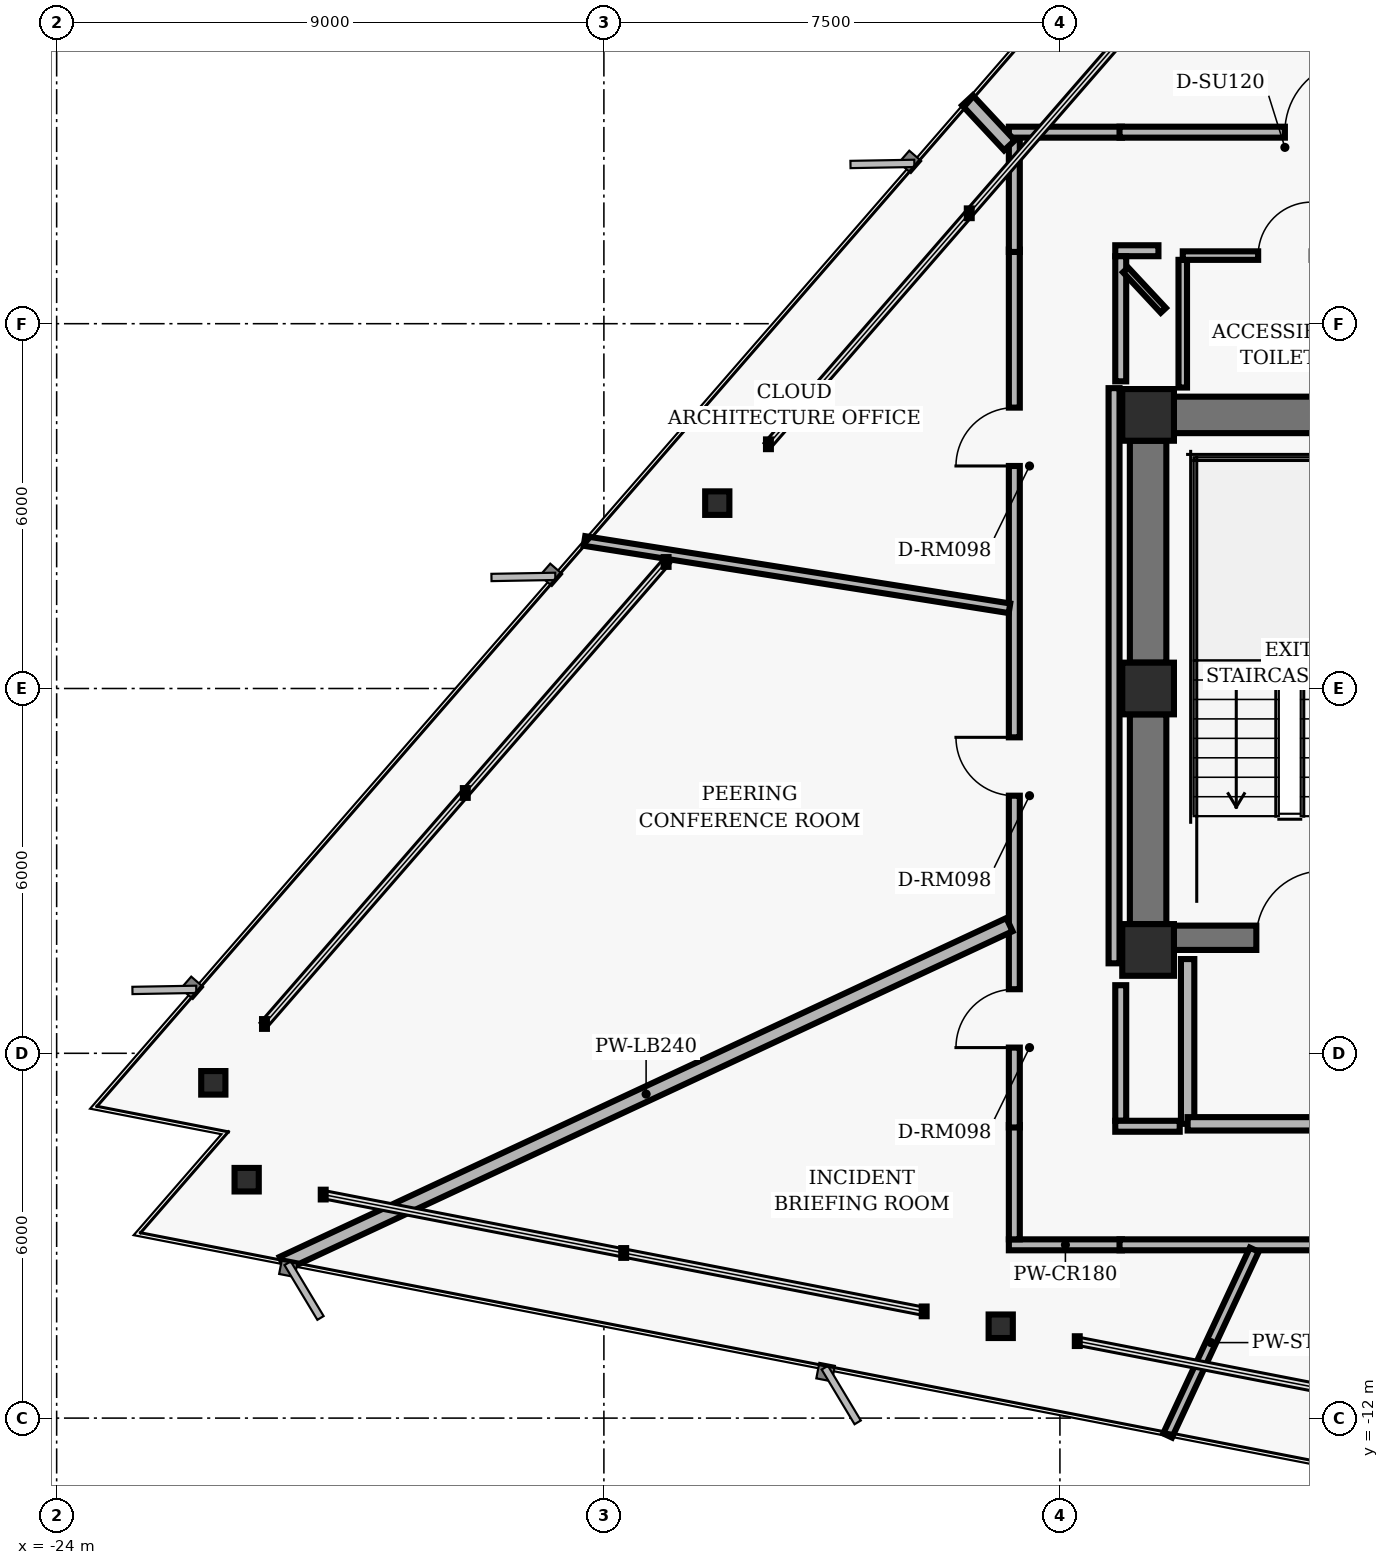
"""IFC4 building model, lengths in metres.
Left out: names, types, materials, properties, quantities, classifications, styles, units other than length and angle.
Written with IfcOpenShell. Run it as: python <this file> out.ifc"""

import sys

from ifc_helpers import new_model, si_unit, direction, frame, frame_2d, origin, origin_2d, place, context, subcontext, project, spatial, rectangle, hollow_rectangle, i_section, extrude, element, fill, save


model = new_model("IFC4")
c1 = context("Model", 3, precision=1e-05, world=origin(), true_north=direction((0.0, 1.0)))
c2 = subcontext(c1, "Body", "Model", "MODEL_VIEW")
j1 = project(units=[si_unit("LENGTHUNIT", "METRE"), si_unit("PLANEANGLEUNIT", "RADIAN")], contexts=[c1])
p1 = place(None, origin())
s1 = spatial("IfcSite", under=j1, at=p1, CompositionType="ELEMENT")
p2 = place(p1, origin())
s2 = spatial("IfcBuilding", under=s1, at=p2, CompositionType="ELEMENT")
p3 = place(p2, frame((0.0, 0.0, 159.36)))
s3 = spatial("IfcBuildingStorey", under=s2, at=p3, CompositionType="ELEMENT", Elevation=159.36)
for number, where, z_axis, x_axis in (
    (1, (-6.05, 4.5, 0.0), (0.0, 0.0, 1.0), (1.0, 0.0, 0.0)),
    (2, (-6.05, 0.0, 0.0), (0.0, 0.0, 1.0), (1.0, 0.0, 0.0)),
    (3, (-6.05, -4.3, 0.0), (0.0, 0.0, 1.0), (1.0, 0.0, 0.0)),
):
    element("IfcColumn", number, at=place(p3, frame(where, z_axis=z_axis, x_axis=x_axis)), inside=s3, PredefinedType="COLUMN", context=c2, shape_type="SweptSolid", body=[
        extrude(hollow_rectangle(XDim=0.85, YDim=0.85, WallThickness=0.055, InnerFilletRadius=0.02, OuterFilletRadius=0.04, at=origin_2d()), origin(), (0.0, 0.0, 1.0), 3.04),
    ])
p4 = place(p3, frame((-6.05, 0.425, 0.0), z_axis=(0.0, 0.0, 1.0), x_axis=(0.0, 1.0, 0.0)))
e4 = element("IfcWall", 4, at=p4, inside=s3, PredefinedType="SHEAR", context=c2, shape_type="SweptSolid", body=[
    extrude(rectangle(XDim=3.65, YDim=0.6, at=frame_2d((1.825, 0.0))), origin(), (0.0, 0.0, 1.0), 2.788),
])
p5 = place(p3, frame((-6.05, -3.875, 0.0), z_axis=(0.0, 0.0, 1.0), x_axis=(0.0, 1.0, 0.0)))
e5 = element("IfcWall", 5, at=p5, inside=s3, PredefinedType="SHEAR", context=c2, shape_type="SweptSolid", body=[
    extrude(rectangle(XDim=3.45, YDim=0.6, at=frame_2d((1.725, 0.0))), origin(), (0.0, 0.0, 1.0), 2.788),
])
p6 = place(p3, frame((-5.625, -4.1, 0.0), z_axis=(0.0, 0.0, 1.0), x_axis=(1.0, 0.0, 0.0)))
e6 = element("IfcWall", 6, at=p6, inside=s3, PredefinedType="SHEAR", context=c2, shape_type="SweptSolid", body=[
    extrude(rectangle(XDim=11.25, YDim=0.4, at=frame_2d((5.625, 0.0))), origin(), (0.0, 0.0, 1.0), 2.788),
])
p7 = place(p6, frame((1.355, 0.0, 0.0)))
e7 = element("IfcOpeningElement", 7, at=p7, cuts=e6, PredefinedType="OPENING", context=c2, shape_type="SweptSolid", body=[
    extrude(rectangle(XDim=1.1, YDim=2.04, at=frame_2d((0.55, 1.02))), frame((0.0, 0.21, 0.0), z_axis=(0.0, -1.0, 0.0), x_axis=(1.0, 0.0, 0.0)), (0.0, 0.0, 1.0), 0.42),
])
p8 = place(p6, frame((8.795, 0.0, 0.0)))
e8 = element("IfcOpeningElement", 8, at=p8, cuts=e6, PredefinedType="OPENING", context=c2, shape_type="SweptSolid", body=[
    extrude(rectangle(XDim=1.1, YDim=2.04, at=frame_2d((0.55, 1.02))), frame((0.0, 0.21, 0.0), z_axis=(0.0, -1.0, 0.0), x_axis=(1.0, 0.0, 0.0)), (0.0, 0.0, 1.0), 0.42),
])
p9 = place(p6, frame((4.095, 0.0, 0.0)))
e9 = element("IfcOpeningElement", 9, at=p9, cuts=e6, PredefinedType="OPENING", context=c2, shape_type="SweptSolid", body=[
    extrude(rectangle(XDim=1.06, YDim=2.04, at=frame_2d((0.53, 1.02))), frame((0.0, 0.21, 0.0), z_axis=(0.0, -1.0, 0.0), x_axis=(1.0, 0.0, 0.0)), (0.0, 0.0, 1.0), 0.42),
])
p10 = place(p6, frame((6.095, 0.0, 0.0)))
e10 = element("IfcOpeningElement", 10, at=p10, cuts=e6, PredefinedType="OPENING", context=c2, shape_type="SweptSolid", body=[
    extrude(rectangle(XDim=1.06, YDim=2.04, at=frame_2d((0.53, 1.02))), frame((0.0, 0.21, 0.0), z_axis=(0.0, -1.0, 0.0), x_axis=(1.0, 0.0, 0.0)), (0.0, 0.0, 1.0), 0.42),
])
p11 = place(p3, frame((-5.625, 4.5, 0.0), z_axis=(0.0, 0.0, 1.0), x_axis=(1.0, 0.0, 0.0)))
e11 = element("IfcWall", 11, at=p11, inside=s3, PredefinedType="SHEAR", context=c2, shape_type="SweptSolid", body=[
    extrude(rectangle(XDim=3.575, YDim=0.6, at=frame_2d((1.788, 0.0))), origin(), (0.0, 0.0, 1.0), 2.788),
])
for number, where, z_axis, x_axis in (
    (12, (-13.135, 3.049, 0.0), (0.0, 0.0, 1.0), (1.0, 0.0, 0.0)),
    (13, (-21.424, -6.486, 0.0), (0.0, 0.0, 1.0), (1.0, 0.0, 0.0)),
    (14, (-20.875, -8.079, 0.0), (0.0, 0.0, 1.0), (1.0, 0.0, 0.0)),
    (15, (-8.474, -10.49, 0.0), (0.0, 0.0, 1.0), (1.0, 0.0, 0.0)),
):
    element("IfcColumn", number, at=place(p3, frame(where, z_axis=z_axis, x_axis=x_axis)), inside=s3, PredefinedType="COLUMN", context=c2, shape_type="SweptSolid", body=[
        extrude(i_section(OverallWidth=0.398, OverallDepth=0.387, WebThickness=0.021, FlangeThickness=0.033, FilletRadius=0.018, at=origin_2d()), origin(), (0.0, 0.0, 1.0), 3.04),
    ])
p12 = place(p3, frame((-5.4, -7.16, 0.0), z_axis=(0.0, 0.0, 1.0), x_axis=(0.0, 1.0, 0.0)))
e16 = element("IfcWall", 16, at=p12, inside=s3, PredefinedType="PARTITIONING", context=c2, shape_type="SweptSolid", body=[
    extrude(rectangle(XDim=2.71, YDim=0.22, at=frame_2d((1.355, 0.0))), origin(), (0.0, 0.0, 1.0), 2.763),
])
p13 = place(p3, frame((-5.4, -7.16, 0.0), z_axis=(0.0, 0.0, 1.0), x_axis=(1.0, 0.0, 0.0)))
e17 = element("IfcWall", 17, at=p13, inside=s3, PredefinedType="PARTITIONING", context=c2, shape_type="SweptSolid", body=[
    extrude(rectangle(XDim=5.4, YDim=0.22, at=frame_2d((2.7, 0.0))), origin(), (0.0, 0.0, 1.0), 2.33),
])
p14 = place(p13, frame((2.05, 0.0, 0.0)))
e18 = element("IfcOpeningElement", 18, at=p14, cuts=e17, PredefinedType="OPENING", context=c2, shape_type="SweptSolid", body=[
    extrude(rectangle(XDim=1.12, YDim=2.02, at=frame_2d((0.56, 1.01))), frame((0.0, 0.12, 0.0), z_axis=(0.0, -1.0, 0.0), x_axis=(1.0, 0.0, 0.0)), (0.0, 0.0, 1.0), 0.24),
])
p15 = place(p3, frame((-5.48, 4.95, 0.0), z_axis=(0.0, 0.0, 1.0), x_axis=(0.0, 1.0, 0.0)))
e19 = element("IfcWall", 19, at=p15, inside=s3, PredefinedType="PARTITIONING", context=c2, shape_type="SweptSolid", body=[
    extrude(rectangle(XDim=2.1, YDim=0.14, at=frame_2d((1.05, 0.0))), origin(), (0.0, 0.0, 1.0), 2.763),
])
p16 = place(p3, frame((-5.48, 7.12, 0.0), z_axis=(0.0, 0.0, 1.0), x_axis=(1.0, 0.0, 0.0)))
e20 = element("IfcWall", 20, at=p16, inside=s3, PredefinedType="PARTITIONING", context=c2, shape_type="SweptSolid", body=[
    extrude(rectangle(XDim=3.36, YDim=0.14, at=frame_2d((1.68, 0.0))), origin(), (0.0, 0.0, 1.0), 2.763),
])
p17 = place(p16, frame((1.24, 0.0, 0.0)))
e21 = element("IfcOpeningElement", 21, at=p17, cuts=e20, PredefinedType="OPENING", context=c2, shape_type="SweptSolid", body=[
    extrude(rectangle(XDim=0.88, YDim=2.02, at=frame_2d((0.44, 1.01))), frame((0.0, 0.08, 0.0), z_axis=(0.0, -1.0, 0.0), x_axis=(1.0, 0.0, 0.0)), (0.0, 0.0, 1.0), 0.16),
])
p18 = place(p3, frame((-6.48, -9.15, 0.0), z_axis=(0.0, 0.0, 1.0), x_axis=(-1.0, 0.0, 0.0)))
e22 = element("IfcWall", 22, at=p18, inside=s3, PredefinedType="PARTITIONING", context=c2, shape_type="SweptSolid", body=[
    extrude(rectangle(XDim=1.86, YDim=0.18, at=frame_2d((0.93, 0.0))), origin(), (0.0, 0.0, 1.0), 2.33),
])
p19 = place(p3, frame((-8.25, -9.06, 0.0), z_axis=(0.0, 0.0, 1.0), x_axis=(0.0, 1.0, 0.0)))
e23 = element("IfcWall", 23, at=p19, inside=s3, PredefinedType="PARTITIONING", context=c2, shape_type="SweptSolid", body=[
    extrude(rectangle(XDim=1.88, YDim=0.18, at=frame_2d((0.94, 0.0))), origin(), (0.0, 0.0, 1.0), 2.763),
])
p20 = place(p3, frame((-8.25, -7.22, 0.0), z_axis=(0.0, 0.0, 1.0), x_axis=(0.0, 1.0, 0.0)))
e24 = element("IfcWall", 24, at=p20, inside=s3, PredefinedType="PARTITIONING", context=c2, shape_type="SweptSolid", body=[
    extrude(rectangle(XDim=14.44, YDim=0.18, at=frame_2d((7.22, 0.0))), origin(), (0.0, 0.0, 1.0), 2.763),
])
p21 = place(p20, frame((5.457, 0.0, 0.0)))
e25 = element("IfcOpeningElement", 25, at=p21, cuts=e24, PredefinedType="OPENING", context=c2, shape_type="SweptSolid", body=[
    extrude(rectangle(XDim=0.96, YDim=2.02, at=frame_2d((0.48, 1.01))), frame((0.0, 0.1, 0.0), z_axis=(0.0, -1.0, 0.0), x_axis=(1.0, 0.0, 0.0)), (0.0, 0.0, 1.0), 0.2),
])
p22 = place(p20, frame((1.314, 0.0, 0.0)))
e26 = element("IfcOpeningElement", 26, at=p22, cuts=e24, PredefinedType="OPENING", context=c2, shape_type="SweptSolid", body=[
    extrude(rectangle(XDim=0.96, YDim=2.02, at=frame_2d((0.48, 1.01))), frame((0.0, 0.1, 0.0), z_axis=(0.0, -1.0, 0.0), x_axis=(1.0, 0.0, 0.0)), (0.0, 0.0, 1.0), 0.2),
])
p23 = place(p20, frame((10.88, 0.0, 0.0)))
e27 = element("IfcOpeningElement", 27, at=p23, cuts=e24, PredefinedType="OPENING", context=c2, shape_type="SweptSolid", body=[
    extrude(rectangle(XDim=0.96, YDim=2.02, at=frame_2d((0.48, 1.01))), frame((0.0, 0.1, 0.0), z_axis=(0.0, -1.0, 0.0), x_axis=(1.0, 0.0, 0.0)), (0.0, 0.0, 1.0), 0.2),
])
p24 = place(p3, frame((-8.25, 7.18, 0.0), z_axis=(0.0, 0.0, 1.0), x_axis=(0.0, 1.0, 0.0)))
e28 = element("IfcWall", 28, at=p24, inside=s3, PredefinedType="PARTITIONING", context=c2, shape_type="SweptSolid", body=[
    extrude(rectangle(XDim=1.88, YDim=0.18, at=frame_2d((0.94, 0.0))), origin(), (0.0, 0.0, 1.0), 2.763),
])
p25 = place(p3, frame((-8.34, 9.15, 0.0), z_axis=(0.0, 0.0, 1.0), x_axis=(1.0, 0.0, 0.0)))
e29 = element("IfcWall", 29, at=p25, inside=s3, PredefinedType="PARTITIONING", context=c2, shape_type="SweptSolid", body=[
    extrude(rectangle(XDim=1.86, YDim=0.18, at=frame_2d((0.93, 0.0))), origin(), (0.0, 0.0, 1.0), 2.763),
])
p26 = place(p3, frame((-6.52, 9.15, 0.0), z_axis=(0.0, 0.0, 1.0), x_axis=(1.0, 0.0, 0.0)))
e30 = element("IfcWall", 30, at=p26, inside=s3, PredefinedType="PARTITIONING", context=c2, shape_type="SweptSolid", body=[
    extrude(rectangle(XDim=16.662, YDim=0.18, at=frame_2d((8.331, 0.0))), origin(), (0.0, 0.0, 1.0), 2.763),
])
p27 = place(p26, frame((9.985, 0.0, 0.0)))
e31 = element("IfcOpeningElement", 31, at=p27, cuts=e30, PredefinedType="OPENING", context=c2, shape_type="SweptSolid", body=[
    extrude(rectangle(XDim=0.96, YDim=2.02, at=frame_2d((0.48, 1.01))), frame((0.0, 0.1, 0.0), z_axis=(0.0, -1.0, 0.0), x_axis=(1.0, 0.0, 0.0)), (0.0, 0.0, 1.0), 0.2),
])
p28 = place(p26, frame((2.719, 0.0, 0.0)))
e32 = element("IfcOpeningElement", 32, at=p28, cuts=e30, PredefinedType="OPENING", context=c2, shape_type="SweptSolid", body=[
    extrude(rectangle(XDim=1.18, YDim=2.02, at=frame_2d((0.59, 1.01))), frame((0.0, 0.1, 0.0), z_axis=(0.0, -1.0, 0.0), x_axis=(1.0, 0.0, 0.0)), (0.0, 0.0, 1.0), 0.2),
])
p29 = place(p3, frame((-5.88, 7.2, 0.0), z_axis=(0.0, 0.0, 1.0), x_axis=(-1.0, 0.0, 0.0)))
e33 = element("IfcWall", 33, at=p29, inside=s3, PredefinedType="PARTITIONING", context=c2, shape_type="SweptSolid", body=[
    extrude(rectangle(XDim=0.71, YDim=0.18, at=frame_2d((0.355, 0.0))), origin(), (0.0, 0.0, 1.0), 2.763),
])
p30 = place(p3, frame((-6.5, 7.11, 0.0), z_axis=(0.0, 0.0, 1.0), x_axis=(0.0, -1.0, 0.0)))
e34 = element("IfcWall", 34, at=p30, inside=s3, PredefinedType="PARTITIONING", context=c2, shape_type="SweptSolid", body=[
    extrude(rectangle(XDim=2.058, YDim=0.18, at=frame_2d((1.029, 0.0))), origin(), (0.0, 0.0, 1.0), 2.763),
])
p31 = place(p3, frame((-6.61, 4.94, 0.0), z_axis=(0.0, 0.0, 1.0), x_axis=(0.0, -1.0, 0.0)))
e35 = element("IfcWall", 35, at=p31, inside=s3, PredefinedType="PARTITIONING", context=c2, shape_type="SweptSolid", body=[
    extrude(rectangle(XDim=9.46, YDim=0.18, at=frame_2d((4.73, 0.0))), origin(), (0.0, 0.0, 1.0), 2.763),
])
p32 = place(p3, frame((-6.5, -4.88, 0.0), z_axis=(0.0, 0.0, 1.0), x_axis=(0.0, -1.0, 0.0)))
e36 = element("IfcWall", 36, at=p32, inside=s3, PredefinedType="PARTITIONING", context=c2, shape_type="SweptSolid", body=[
    extrude(rectangle(XDim=2.23, YDim=0.18, at=frame_2d((1.115, 0.0))), origin(), (0.0, 0.0, 1.0), 2.763),
])
p33 = place(p3, frame((-6.59, -7.2, 0.0), z_axis=(0.0, 0.0, 1.0), x_axis=(1.0, 0.0, 0.0)))
e37 = element("IfcWall", 37, at=p33, inside=s3, PredefinedType="PARTITIONING", context=c2, shape_type="SweptSolid", body=[
    extrude(rectangle(XDim=1.06, YDim=0.18, at=frame_2d((0.53, 0.0))), origin(), (0.0, 0.0, 1.0), 2.763),
])
p34 = place(p3, frame((10.98, -9.15, 0.0), z_axis=(0.0, 0.0, 1.0), x_axis=(-1.0, 0.0, 0.0)))
e38 = element("IfcWall", 38, at=p34, inside=s3, PredefinedType="PARTITIONING", context=c2, shape_type="SweptSolid", body=[
    extrude(rectangle(XDim=17.5, YDim=0.18, at=frame_2d((8.75, 0.0))), origin(), (0.0, 0.0, 1.0), 2.33),
])
p35 = place(p34, frame((11.417, 0.0, 0.0)))
e39 = element("IfcOpeningElement", 39, at=p35, cuts=e38, PredefinedType="OPENING", context=c2, shape_type="SweptSolid", body=[
    extrude(rectangle(XDim=0.96, YDim=2.02, at=frame_2d((0.48, 1.01))), frame((0.0, 0.1, 0.0), z_axis=(0.0, -1.0, 0.0), x_axis=(1.0, 0.0, 0.0)), (0.0, 0.0, 1.0), 0.2),
])
p36 = place(p34, frame((3.872, 0.0, 0.0)))
e40 = element("IfcOpeningElement", 40, at=p36, cuts=e38, PredefinedType="OPENING", context=c2, shape_type="SweptSolid", body=[
    extrude(rectangle(XDim=1.02, YDim=2.02, at=frame_2d((0.51, 1.01))), frame((0.0, 0.1, 0.0), z_axis=(0.0, -1.0, 0.0), x_axis=(1.0, 0.0, 0.0)), (0.0, 0.0, 1.0), 0.2),
])
p37 = place(p3, frame((-8.33, -3.884, 0.0), z_axis=(0.0, 0.0, 1.0), x_axis=(-0.906301821786, -0.422631054026, 0.0)))
e41 = element("IfcWall", 41, at=p37, inside=s3, PredefinedType="PARTITIONING", context=c2, shape_type="SweptSolid", body=[
    extrude(rectangle(XDim=13.187, YDim=0.24, at=frame_2d((6.594, 0.0))), origin(), (0.0, 0.0, 1.0), 2.132),
])
p38 = place(p3, frame((-4.304, -9.23, 0.0), z_axis=(0.0, 0.0, 1.0), x_axis=(-0.422604032696, -0.906314422013, 0.0)))
e42 = element("IfcWall", 42, at=p38, inside=s3, PredefinedType="PARTITIONING", context=c2, shape_type="SweptSolid", body=[
    extrude(rectangle(XDim=3.372, YDim=0.16, at=frame_2d((1.686, 0.0))), origin(), (0.0, 0.0, 1.0), 2.763),
])
p39 = place(p3, frame((-5.8, 6.22, 0.0), z_axis=(0.0, 0.0, 1.0), x_axis=(-0.681964083565, 0.731385663469, 0.0)))
e43 = element("IfcWall", 43, at=p39, inside=s3, PredefinedType="MOVABLE", context=c2, shape_type="SweptSolid", body=[
    extrude(rectangle(XDim=0.909, YDim=0.115, at=frame_2d((0.455, 0.0))), origin(), (0.0, 0.0, 1.0), 2.763),
])
p40 = place(p3, frame((-8.33, 8.933, 0.0), z_axis=(0.0, 0.0, 1.0), x_axis=(-0.68206891796, 0.731287898952, 0.0)))
e44 = element("IfcWall", 44, at=p40, inside=s3, PredefinedType="PARTITIONING", context=c2, shape_type="SweptSolid", body=[
    extrude(rectangle(XDim=1.012, YDim=0.24, at=frame_2d((0.506, 0.0))), origin(), (0.0, 0.0, 1.0), 2.763),
])
p41 = place(p3, frame((-8.33, 1.319, 0.0), z_axis=(0.0, 0.0, 1.0), x_axis=(-0.987685078896, 0.156455057208, 0.0)))
e45 = element("IfcWall", 45, at=p41, inside=s3, PredefinedType="PARTITIONING", context=c2, shape_type="SweptSolid", body=[
    extrude(rectangle(XDim=7.077, YDim=0.16, at=frame_2d((3.538, 0.0))), origin(), (0.0, 0.0, 1.0), 2.763),
])
p42 = place(p7, origin())
e46 = element("IfcDoor", 46, at=p42, inside=s3, OperationType="SINGLE_SWING_RIGHT", PredefinedType="DOOR", context=c2, shape_type="SweptSolid", body=[
    extrude(rectangle(XDim=1.1, YDim=2.04, at=frame_2d((0.55, 1.02))), frame((0.0, 0.025, 0.0), z_axis=(0.0, -1.0, 0.0), x_axis=(1.0, 0.0, 0.0)), (0.0, 0.0, 1.0), 0.05),
])
fill(e7, e46)
p43 = place(p17, origin())
e47 = element("IfcDoor", 47, at=p43, inside=s3, OperationType="SINGLE_SWING_RIGHT", PredefinedType="DOOR", context=c2, shape_type="SweptSolid", body=[
    extrude(rectangle(XDim=0.88, YDim=2.02, at=frame_2d((0.44, 1.01))), frame((0.0, 0.025, 0.0), z_axis=(0.0, -1.0, 0.0), x_axis=(1.0, 0.0, 0.0)), (0.0, 0.0, 1.0), 0.05),
])
fill(e21, e47)
p44 = place(p21, origin())
e48 = element("IfcDoor", 48, at=p44, inside=s3, OperationType="SINGLE_SWING_RIGHT", PredefinedType="DOOR", context=c2, shape_type="SweptSolid", body=[
    extrude(rectangle(XDim=0.96, YDim=2.02, at=frame_2d((0.48, 1.01))), frame((0.0, 0.025, 0.0), z_axis=(0.0, -1.0, 0.0), x_axis=(1.0, 0.0, 0.0)), (0.0, 0.0, 1.0), 0.05),
])
fill(e25, e48)
p45 = place(p22, origin())
e49 = element("IfcDoor", 49, at=p45, inside=s3, OperationType="SINGLE_SWING_LEFT", PredefinedType="DOOR", context=c2, shape_type="SweptSolid", body=[
    extrude(rectangle(XDim=0.96, YDim=2.02, at=frame_2d((0.48, 1.01))), frame((0.0, 0.025, 0.0), z_axis=(0.0, -1.0, 0.0), x_axis=(1.0, 0.0, 0.0)), (0.0, 0.0, 1.0), 0.05),
])
fill(e26, e49)
p46 = place(p28, origin())
e50 = element("IfcDoor", 50, at=p46, inside=s3, OperationType="SINGLE_SWING_RIGHT", PredefinedType="DOOR", context=c2, shape_type="SweptSolid", body=[
    extrude(rectangle(XDim=1.18, YDim=2.02, at=frame_2d((0.59, 1.01))), frame((0.0, 0.025, 0.0), z_axis=(0.0, -1.0, 0.0), x_axis=(1.0, 0.0, 0.0)), (0.0, 0.0, 1.0), 0.05),
])
fill(e32, e50)
p47 = place(p23, origin())
e51 = element("IfcDoor", 51, at=p47, inside=s3, OperationType="SINGLE_SWING_LEFT", PredefinedType="DOOR", context=c2, shape_type="SweptSolid", body=[
    extrude(rectangle(XDim=0.96, YDim=2.02, at=frame_2d((0.48, 1.01))), frame((0.0, 0.025, 0.0), z_axis=(0.0, -1.0, 0.0), x_axis=(1.0, 0.0, 0.0)), (0.0, 0.0, 1.0), 0.05),
])
fill(e27, e51)
save(model, sys.argv[1])
